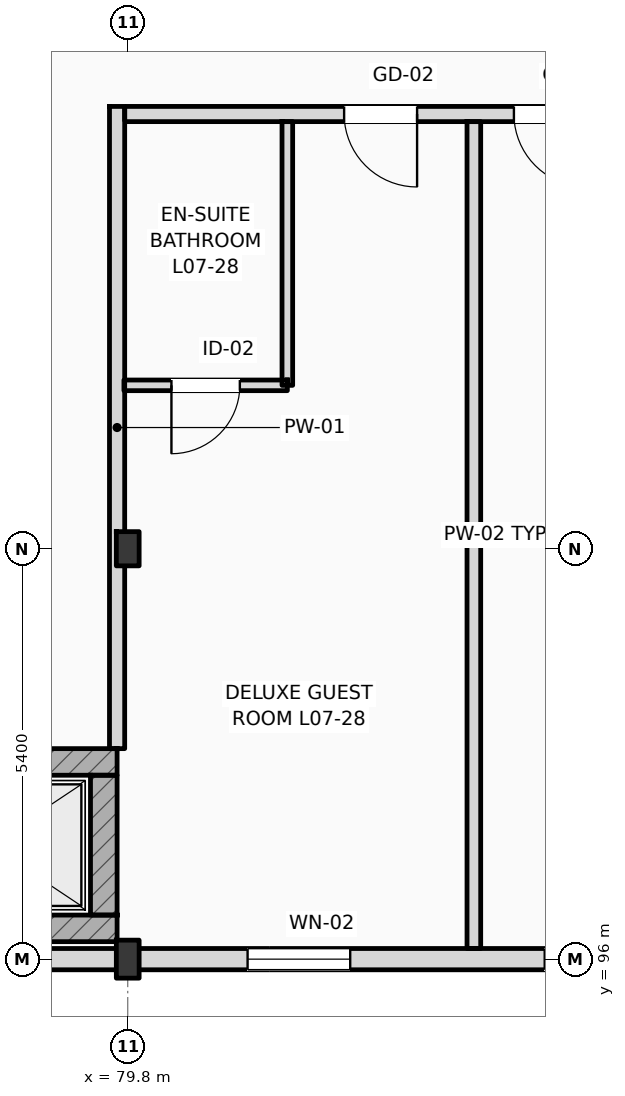
"""IFC4 building model, lengths in metres.
Left out: names, types, materials, properties, quantities, classifications, styles, units other than length and angle.
Written with IfcOpenShell. Run it as: python <this file> out.ifc"""

import sys

from ifc_helpers import new_model, si_unit, direction, frame, frame_2d, origin, origin_2d, place, context, subcontext, project, spatial, rectangle, i_section, extrude, element, fill, save


model = new_model("IFC4")
c1 = context("Model", 3, precision=1e-05, world=origin(), true_north=direction((0.0, 1.0)))
c2 = subcontext(c1, "Body", "Model", "MODEL_VIEW")
j1 = project(units=[si_unit("LENGTHUNIT", "METRE"), si_unit("PLANEANGLEUNIT", "RADIAN")], contexts=[c1])
p1 = place(None, origin())
s1 = spatial("IfcSite", under=j1, at=p1, CompositionType="ELEMENT")
p2 = place(p1, origin())
s2 = spatial("IfcBuilding", under=s1, at=p2, CompositionType="ELEMENT")
p3 = place(p2, frame((0.0, 0.0, 31.8)))
s3 = spatial("IfcBuildingStorey", under=s2, at=p3, CompositionType="ELEMENT", Elevation=31.8)
p4 = place(p3, frame((79.8, 96.0, 0.0), z_axis=(0.0, 0.0, 1.0), x_axis=(1.0, 0.0, 0.0)))
e1 = element("IfcColumn", 1, at=p4, inside=s3, PredefinedType="COLUMN", context=c2, shape_type="SweptSolid", body=[
    extrude(i_section(OverallWidth=0.3, OverallDepth=0.5, WebThickness=0.014, FlangeThickness=0.028, FilletRadius=0.027, at=origin_2d()), origin(), (0.0, 0.0, 1.0), 3.6),
])
p5 = place(p3, frame((79.8, 101.4, 0.0), z_axis=(0.0, 0.0, 1.0), x_axis=(1.0, 0.0, 0.0)))
e2 = element("IfcColumn", 2, at=p5, inside=s3, PredefinedType="COLUMN", context=c2, shape_type="SweptSolid", body=[
    extrude(i_section(OverallWidth=0.3, OverallDepth=0.45, WebThickness=0.014, FlangeThickness=0.026, FilletRadius=0.027, at=origin_2d()), origin(), (0.0, 0.0, 1.0), 3.6),
])
p6 = place(p3, frame((25.2, 96.0, 0.0), z_axis=(0.0, 0.0, 1.0), x_axis=(1.0, 0.0, 0.0)))
e3 = element("IfcWall", 3, at=p6, inside=s3, PredefinedType="STANDARD", context=c2, shape_type="SweptSolid", body=[
    extrude(rectangle(XDim=94.8, YDim=0.28, at=frame_2d((47.4, 0.0))), origin(), (0.0, 0.0, 1.0), 2.72),
])
p7 = place(p6, frame((16.394, 0.0, 0.9)))
e4 = element("IfcOpeningElement", 4, at=p7, cuts=e3, PredefinedType="OPENING", context=c2, shape_type="SweptSolid", body=[
    extrude(rectangle(XDim=2.0, YDim=1.64, at=frame_2d((1.0, 0.82))), frame((0.0, 0.15, 0.0), z_axis=(0.0, -1.0, 0.0), x_axis=(1.0, 0.0, 0.0)), (0.0, 0.0, 1.0), 0.3),
])
p8 = place(p6, frame((20.207, 0.0, 0.9)))
e5 = element("IfcOpeningElement", 5, at=p8, cuts=e3, PredefinedType="OPENING", context=c2, shape_type="SweptSolid", body=[
    extrude(rectangle(XDim=2.3, YDim=1.64, at=frame_2d((1.15, 0.82))), frame((0.0, 0.15, 0.0), z_axis=(0.0, -1.0, 0.0), x_axis=(1.0, 0.0, 0.0)), (0.0, 0.0, 1.0), 0.3),
])
p9 = place(p6, frame((24.287, 0.0, 0.9)))
e6 = element("IfcOpeningElement", 6, at=p9, cuts=e3, PredefinedType="OPENING", context=c2, shape_type="SweptSolid", body=[
    extrude(rectangle(XDim=2.358, YDim=1.64, at=frame_2d((1.179, 0.82))), frame((0.0, 0.15, 0.0), z_axis=(0.0, -1.0, 0.0), x_axis=(1.0, 0.0, 0.0)), (0.0, 0.0, 1.0), 0.3),
])
p10 = place(p6, frame((27.665, 0.0, 0.9)))
e7 = element("IfcOpeningElement", 7, at=p10, cuts=e3, PredefinedType="OPENING", context=c2, shape_type="SweptSolid", body=[
    extrude(rectangle(XDim=1.8, YDim=1.64, at=frame_2d((0.9, 0.82))), frame((0.0, 0.15, 0.0), z_axis=(0.0, -1.0, 0.0), x_axis=(1.0, 0.0, 0.0)), (0.0, 0.0, 1.0), 0.3),
])
p11 = place(p6, frame((32.103, 0.0, 0.9)))
e8 = element("IfcOpeningElement", 8, at=p11, cuts=e3, PredefinedType="OPENING", context=c2, shape_type="SweptSolid", body=[
    extrude(rectangle(XDim=2.359, YDim=1.64, at=frame_2d((1.179, 0.82))), frame((0.0, 0.15, 0.0), z_axis=(0.0, -1.0, 0.0), x_axis=(1.0, 0.0, 0.0)), (0.0, 0.0, 1.0), 0.3),
])
p12 = place(p6, frame((36.336, 0.0, 0.9)))
e9 = element("IfcOpeningElement", 9, at=p12, cuts=e3, PredefinedType="OPENING", context=c2, shape_type="SweptSolid", body=[
    extrude(rectangle(XDim=1.2, YDim=1.64, at=frame_2d((0.6, 0.82))), frame((0.0, 0.15, 0.0), z_axis=(0.0, -1.0, 0.0), x_axis=(1.0, 0.0, 0.0)), (0.0, 0.0, 1.0), 0.3),
])
p13 = place(p6, frame((56.177, 0.0, 0.9)))
e10 = element("IfcOpeningElement", 10, at=p13, cuts=e3, PredefinedType="OPENING", context=c2, shape_type="SweptSolid", body=[
    extrude(rectangle(XDim=1.35, YDim=1.64, at=frame_2d((0.675, 0.82))), frame((0.0, 0.15, 0.0), z_axis=(0.0, -1.0, 0.0), x_axis=(1.0, 0.0, 0.0)), (0.0, 0.0, 1.0), 0.3),
])
p14 = place(p6, frame((60.086, 0.0, 0.9)))
e11 = element("IfcOpeningElement", 11, at=p14, cuts=e3, PredefinedType="OPENING", context=c2, shape_type="SweptSolid", body=[
    extrude(rectangle(XDim=1.5, YDim=1.64, at=frame_2d((0.75, 0.82))), frame((0.0, 0.15, 0.0), z_axis=(0.0, -1.0, 0.0), x_axis=(1.0, 0.0, 0.0)), (0.0, 0.0, 1.0), 0.3),
])
p15 = place(p6, frame((64.838, 0.0, 0.9)))
e12 = element("IfcOpeningElement", 12, at=p15, cuts=e3, PredefinedType="OPENING", context=c2, shape_type="SweptSolid", body=[
    extrude(rectangle(XDim=1.65, YDim=1.64, at=frame_2d((0.825, 0.82))), frame((0.0, 0.15, 0.0), z_axis=(0.0, -1.0, 0.0), x_axis=(1.0, 0.0, 0.0)), (0.0, 0.0, 1.0), 0.3),
])
p16 = place(p6, frame((68.419, 0.0, 0.9)))
e13 = element("IfcOpeningElement", 13, at=p16, cuts=e3, PredefinedType="OPENING", context=c2, shape_type="SweptSolid", body=[
    extrude(rectangle(XDim=0.9, YDim=1.64, at=frame_2d((0.45, 0.82))), frame((0.0, 0.15, 0.0), z_axis=(0.0, -1.0, 0.0), x_axis=(1.0, 0.0, 0.0)), (0.0, 0.0, 1.0), 0.3),
])
p17 = place(p6, frame((73.544, 0.0, 0.9)))
e14 = element("IfcOpeningElement", 14, at=p17, cuts=e3, PredefinedType="OPENING", context=c2, shape_type="SweptSolid", body=[
    extrude(rectangle(XDim=1.95, YDim=1.64, at=frame_2d((0.975, 0.82))), frame((0.0, 0.15, 0.0), z_axis=(0.0, -1.0, 0.0), x_axis=(1.0, 0.0, 0.0)), (0.0, 0.0, 1.0), 0.3),
])
p18 = place(p6, frame((78.897, 0.0, 0.9)))
e15 = element("IfcOpeningElement", 15, at=p18, cuts=e3, PredefinedType="OPENING", context=c2, shape_type="SweptSolid", body=[
    extrude(rectangle(XDim=1.35, YDim=1.64, at=frame_2d((0.675, 0.82))), frame((0.0, 0.15, 0.0), z_axis=(0.0, -1.0, 0.0), x_axis=(1.0, 0.0, 0.0)), (0.0, 0.0, 1.0), 0.3),
])
p19 = place(p6, frame((82.249, 0.0, 0.9)))
e16 = element("IfcOpeningElement", 16, at=p19, cuts=e3, PredefinedType="OPENING", context=c2, shape_type="SweptSolid", body=[
    extrude(rectangle(XDim=2.25, YDim=1.64, at=frame_2d((1.125, 0.82))), frame((0.0, 0.15, 0.0), z_axis=(0.0, -1.0, 0.0), x_axis=(1.0, 0.0, 0.0)), (0.0, 0.0, 1.0), 0.3),
])
p20 = place(p6, frame((87.202, 0.0, 0.9)))
e17 = element("IfcOpeningElement", 17, at=p20, cuts=e3, PredefinedType="OPENING", context=c2, shape_type="SweptSolid", body=[
    extrude(rectangle(XDim=1.8, YDim=1.64, at=frame_2d((0.9, 0.82))), frame((0.0, 0.15, 0.0), z_axis=(0.0, -1.0, 0.0), x_axis=(1.0, 0.0, 0.0)), (0.0, 0.0, 1.0), 0.3),
])
p21 = place(p6, frame((90.867, 0.0, 0.9)))
e18 = element("IfcOpeningElement", 18, at=p21, cuts=e3, PredefinedType="OPENING", context=c2, shape_type="SweptSolid", body=[
    extrude(rectangle(XDim=2.55, YDim=1.64, at=frame_2d((1.275, 0.82))), frame((0.0, 0.15, 0.0), z_axis=(0.0, -1.0, 0.0), x_axis=(1.0, 0.0, 0.0)), (0.0, 0.0, 1.0), 0.3),
])
p22 = place(p3, frame((76.67, 98.595, 0.0), z_axis=(0.0, 0.0, 1.0), x_axis=(1.0, 0.0, 0.0)))
e19 = element("IfcWall", 19, at=p22, inside=s3, PredefinedType="SHEAR", context=c2, shape_type="SweptSolid", body=[
    extrude(rectangle(XDim=2.99, YDim=0.35, at=frame_2d((1.495, 0.0))), origin(), (0.0, 0.0, 1.0), 3.36),
])
p23 = place(p22, frame((0.695, 0.0, 0.0)))
e20 = element("IfcOpeningElement", 20, at=p23, cuts=e19, PredefinedType="OPENING", context=c2, shape_type="SweptSolid", body=[
    extrude(rectangle(XDim=1.25, YDim=2.25, at=frame_2d((0.625, 1.125))), frame((0.0, 0.185, 0.0), z_axis=(0.0, -1.0, 0.0), x_axis=(1.0, 0.0, 0.0)), (0.0, 0.0, 1.0), 0.37),
])
p24 = place(p3, frame((76.67, 96.405, 0.0), z_axis=(0.0, 0.0, 1.0), x_axis=(1.0, 0.0, 0.0)))
e21 = element("IfcWall", 21, at=p24, inside=s3, PredefinedType="SHEAR", context=c2, shape_type="SweptSolid", body=[
    extrude(rectangle(XDim=2.99, YDim=0.35, at=frame_2d((1.495, 0.0))), origin(), (0.0, 0.0, 1.0), 3.36),
])
p25 = place(p3, frame((79.485, 96.58, 0.0), z_axis=(0.0, 0.0, 1.0), x_axis=(0.0, 1.0, 0.0)))
e22 = element("IfcWall", 22, at=p25, inside=s3, PredefinedType="SHEAR", context=c2, shape_type="SweptSolid", body=[
    extrude(rectangle(XDim=1.84, YDim=0.35, at=frame_2d((0.92, 0.0))), origin(), (0.0, 0.0, 1.0), 2.99),
])
p26 = place(p3, frame((79.76, 107.12, 0.0), z_axis=(0.0, 0.0, 1.0), x_axis=(1.0, 0.0, 0.0)))
e23 = element("IfcWall", 23, at=p26, inside=s3, PredefinedType="PARTITIONING", context=c2, shape_type="SweptSolid", body=[
    extrude(rectangle(XDim=40.1, YDim=0.2, at=frame_2d((20.05, 0.0))), origin(), (0.0, 0.0, 1.0), 3.36),
])
p27 = place(p26, frame((2.887, 0.0, 0.0)))
e24 = element("IfcOpeningElement", 24, at=p27, cuts=e23, PredefinedType="OPENING", context=c2, shape_type="SweptSolid", body=[
    extrude(rectangle(XDim=0.96, YDim=2.2, at=frame_2d((0.48, 1.1))), frame((0.0, 0.11, 0.0), z_axis=(0.0, -1.0, 0.0), x_axis=(1.0, 0.0, 0.0)), (0.0, 0.0, 1.0), 0.22),
])
p28 = place(p26, frame((5.121, 0.0, 0.0)))
e25 = element("IfcOpeningElement", 25, at=p28, cuts=e23, PredefinedType="OPENING", context=c2, shape_type="SweptSolid", body=[
    extrude(rectangle(XDim=0.96, YDim=2.2, at=frame_2d((0.48, 1.1))), frame((0.0, 0.11, 0.0), z_axis=(0.0, -1.0, 0.0), x_axis=(1.0, 0.0, 0.0)), (0.0, 0.0, 1.0), 0.22),
])
p29 = place(p26, frame((11.698, 0.0, 0.0)))
e26 = element("IfcOpeningElement", 26, at=p29, cuts=e23, PredefinedType="OPENING", context=c2, shape_type="SweptSolid", body=[
    extrude(rectangle(XDim=0.96, YDim=2.2, at=frame_2d((0.48, 1.1))), frame((0.0, 0.11, 0.0), z_axis=(0.0, -1.0, 0.0), x_axis=(1.0, 0.0, 0.0)), (0.0, 0.0, 1.0), 0.22),
])
p30 = place(p26, frame((13.976, 0.0, 0.0)))
e27 = element("IfcOpeningElement", 27, at=p30, cuts=e23, PredefinedType="OPENING", context=c2, shape_type="SweptSolid", body=[
    extrude(rectangle(XDim=0.96, YDim=2.2, at=frame_2d((0.48, 1.1))), frame((0.0, 0.11, 0.0), z_axis=(0.0, -1.0, 0.0), x_axis=(1.0, 0.0, 0.0)), (0.0, 0.0, 1.0), 0.22),
])
p31 = place(p26, frame((20.554, 0.0, 0.0)))
e28 = element("IfcOpeningElement", 28, at=p31, cuts=e23, PredefinedType="OPENING", context=c2, shape_type="SweptSolid", body=[
    extrude(rectangle(XDim=0.96, YDim=2.2, at=frame_2d((0.48, 1.1))), frame((0.0, 0.11, 0.0), z_axis=(0.0, -1.0, 0.0), x_axis=(1.0, 0.0, 0.0)), (0.0, 0.0, 1.0), 0.22),
])
p32 = place(p26, frame((24.982, 0.0, 0.0)))
e29 = element("IfcOpeningElement", 29, at=p32, cuts=e23, PredefinedType="OPENING", context=c2, shape_type="SweptSolid", body=[
    extrude(rectangle(XDim=0.96, YDim=2.2, at=frame_2d((0.48, 1.1))), frame((0.0, 0.11, 0.0), z_axis=(0.0, -1.0, 0.0), x_axis=(1.0, 0.0, 0.0)), (0.0, 0.0, 1.0), 0.22),
])
p33 = place(p26, frame((29.409, 0.0, 0.0)))
e30 = element("IfcOpeningElement", 30, at=p33, cuts=e23, PredefinedType="OPENING", context=c2, shape_type="SweptSolid", body=[
    extrude(rectangle(XDim=0.96, YDim=2.2, at=frame_2d((0.48, 1.1))), frame((0.0, 0.11, 0.0), z_axis=(0.0, -1.0, 0.0), x_axis=(1.0, 0.0, 0.0)), (0.0, 0.0, 1.0), 0.22),
])
p34 = place(p26, frame((33.837, 0.0, 0.0)))
e31 = element("IfcOpeningElement", 31, at=p34, cuts=e23, PredefinedType="OPENING", context=c2, shape_type="SweptSolid", body=[
    extrude(rectangle(XDim=0.96, YDim=2.2, at=frame_2d((0.48, 1.1))), frame((0.0, 0.11, 0.0), z_axis=(0.0, -1.0, 0.0), x_axis=(1.0, 0.0, 0.0)), (0.0, 0.0, 1.0), 0.22),
])
p35 = place(p26, frame((36.027, 0.0, 0.0)))
e32 = element("IfcOpeningElement", 32, at=p35, cuts=e23, PredefinedType="OPENING", context=c2, shape_type="SweptSolid", body=[
    extrude(rectangle(XDim=0.96, YDim=2.2, at=frame_2d((0.48, 1.1))), frame((0.0, 0.11, 0.0), z_axis=(0.0, -1.0, 0.0), x_axis=(1.0, 0.0, 0.0)), (0.0, 0.0, 1.0), 0.22),
])
p36 = place(p3, frame((79.66, 98.77, 0.0), z_axis=(0.0, 0.0, 1.0), x_axis=(0.0, 1.0, 0.0)))
e33 = element("IfcWall", 33, at=p36, inside=s3, PredefinedType="PARTITIONING", context=c2, shape_type="SweptSolid", body=[
    extrude(rectangle(XDim=8.45, YDim=0.2, at=frame_2d((4.225, 0.0))), origin(), (0.0, 0.0, 1.0), 2.99),
])
p37 = place(p3, frame((84.354, 96.14, 0.0), z_axis=(0.0, 0.0, 1.0), x_axis=(0.0, 1.0, 0.0)))
e34 = element("IfcWall", 34, at=p37, inside=s3, PredefinedType="PARTITIONING", context=c2, shape_type="SweptSolid", body=[
    extrude(rectangle(XDim=10.88, YDim=0.18, at=frame_2d((5.44, 0.0))), origin(), (0.0, 0.0, 1.0), 3.36),
])
p38 = place(p3, frame((81.9, 103.55, 0.0), z_axis=(0.0, 0.0, 1.0), x_axis=(0.0, 1.0, 0.0)))
e35 = element("IfcWall", 35, at=p38, inside=s3, PredefinedType="PARTITIONING", context=c2, shape_type="SweptSolid", body=[
    extrude(rectangle(XDim=3.47, YDim=0.14, at=frame_2d((1.735, 0.0))), origin(), (0.0, 0.0, 1.0), 3.36),
])
p39 = place(p3, frame((79.75, 103.55, 0.0), z_axis=(0.0, 0.0, 1.0), x_axis=(1.0, 0.0, 0.0)))
e36 = element("IfcWall", 36, at=p39, inside=s3, PredefinedType="PARTITIONING", context=c2, shape_type="SweptSolid", body=[
    extrude(rectangle(XDim=2.15, YDim=0.14, at=frame_2d((1.075, 0.0))), origin(), (0.0, 0.0, 1.0), 3.36),
])
p40 = place(p39, frame((0.625, 0.0, 0.0)))
e37 = element("IfcOpeningElement", 37, at=p40, cuts=e36, PredefinedType="OPENING", context=c2, shape_type="SweptSolid", body=[
    extrude(rectangle(XDim=0.9, YDim=2.1, at=frame_2d((0.45, 1.05))), frame((0.0, 0.08, 0.0), z_axis=(0.0, -1.0, 0.0), x_axis=(1.0, 0.0, 0.0)), (0.0, 0.0, 1.0), 0.16),
])
p41 = place(p13, origin())
e38 = element("IfcWindow", 38, at=p41, inside=s3, PartitioningType="DOUBLE_PANEL_VERTICAL", PredefinedType="WINDOW", context=c2, shape_type="SweptSolid", body=[
    extrude(rectangle(XDim=1.35, YDim=1.64, at=frame_2d((0.675, 0.82))), frame((0.0, 0.03, 0.0), z_axis=(0.0, -1.0, 0.0), x_axis=(1.0, 0.0, 0.0)), (0.0, 0.0, 1.0), 0.06),
])
fill(e10, e38)
p42 = place(p14, origin())
e39 = element("IfcWindow", 39, at=p42, inside=s3, PartitioningType="DOUBLE_PANEL_VERTICAL", PredefinedType="WINDOW", context=c2, shape_type="SweptSolid", body=[
    extrude(rectangle(XDim=1.5, YDim=1.64, at=frame_2d((0.75, 0.82))), frame((0.0, 0.03, 0.0), z_axis=(0.0, -1.0, 0.0), x_axis=(1.0, 0.0, 0.0)), (0.0, 0.0, 1.0), 0.06),
])
fill(e11, e39)
p43 = place(p27, frame((0.96, 0.0, 0.0), z_axis=(0.0, 0.0, 1.0), x_axis=(-1.0, 0.0, 0.0)))
e40 = element("IfcDoor", 40, at=p43, inside=s3, OperationType="SINGLE_SWING_RIGHT", PredefinedType="DOOR", context=c2, shape_type="SweptSolid", body=[
    extrude(rectangle(XDim=0.96, YDim=2.2, at=frame_2d((0.48, 1.1))), frame((0.0, 0.025, 0.0), z_axis=(0.0, -1.0, 0.0), x_axis=(1.0, 0.0, 0.0)), (0.0, 0.0, 1.0), 0.05),
])
fill(e24, e40)
p44 = place(p40, frame((0.9, 0.0, 0.0), z_axis=(0.0, 0.0, 1.0), x_axis=(-1.0, 0.0, 0.0)))
e41 = element("IfcDoor", 41, at=p44, inside=s3, OperationType="SINGLE_SWING_LEFT", PredefinedType="DOOR", context=c2, shape_type="SweptSolid", body=[
    extrude(rectangle(XDim=0.9, YDim=2.1, at=frame_2d((0.45, 1.05))), frame((0.0, 0.025, 0.0), z_axis=(0.0, -1.0, 0.0), x_axis=(1.0, 0.0, 0.0)), (0.0, 0.0, 1.0), 0.05),
])
fill(e37, e41)
p45 = place(p28, frame((0.96, 0.0, 0.0), z_axis=(0.0, 0.0, 1.0), x_axis=(-1.0, 0.0, 0.0)))
e42 = element("IfcDoor", 42, at=p45, inside=s3, OperationType="SINGLE_SWING_RIGHT", PredefinedType="DOOR", context=c2, shape_type="SweptSolid", body=[
    extrude(rectangle(XDim=0.96, YDim=2.2, at=frame_2d((0.48, 1.1))), frame((0.0, 0.025, 0.0), z_axis=(0.0, -1.0, 0.0), x_axis=(1.0, 0.0, 0.0)), (0.0, 0.0, 1.0), 0.05),
])
fill(e25, e42)
save(model, sys.argv[1])
